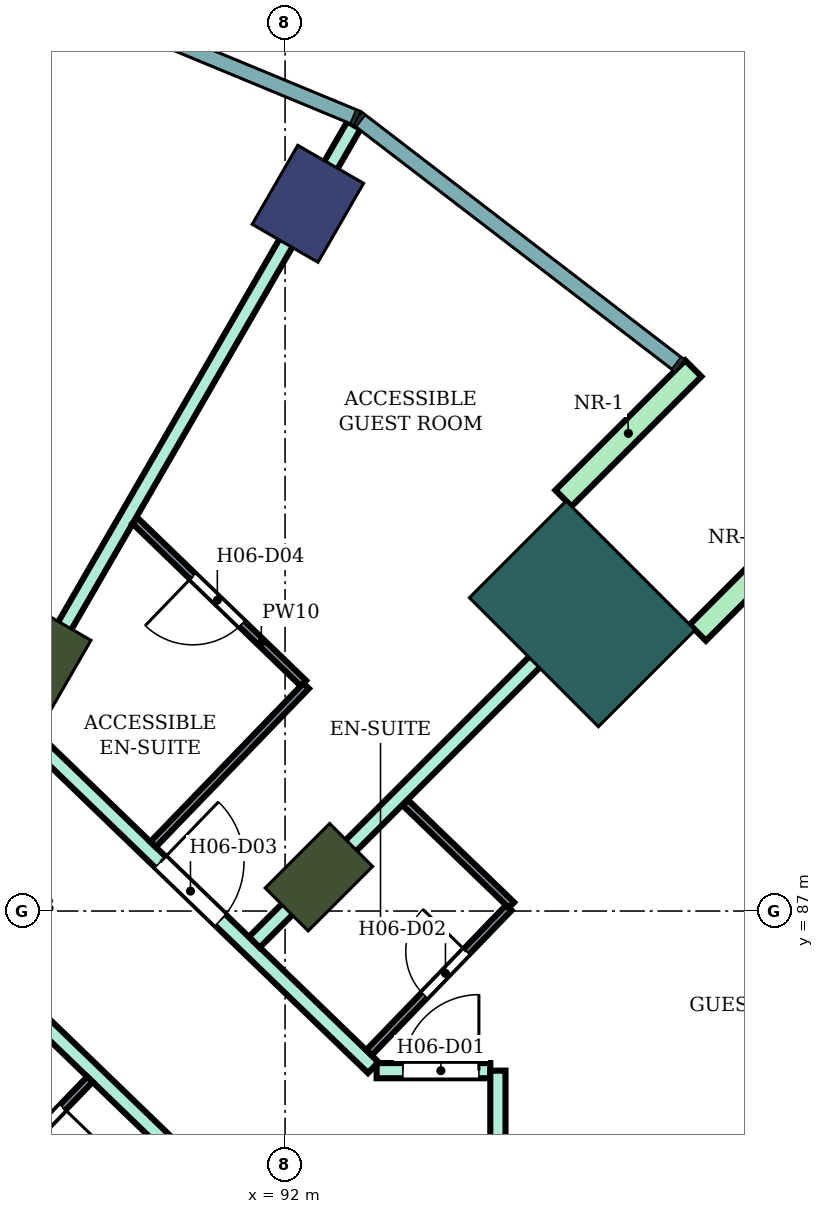
"""IFC4 building model, lengths in metres.
Left out: names, types, materials, properties, quantities, classifications, styles, units other than length and angle.
Written with IfcOpenShell. Run it as: python <this file> out.ifc"""

import sys

from ifc_helpers import new_model, si_unit, direction, frame, frame_2d, origin, origin_2d, place, context, subcontext, project, spatial, rectangle, extrude, element, fill, save


model = new_model("IFC4")
c1 = context("Model", 3, precision=1e-05, world=origin(), true_north=direction((0.0, 1.0)))
c2 = subcontext(c1, "Body", "Model", "MODEL_VIEW")
j1 = project(units=[si_unit("LENGTHUNIT", "METRE"), si_unit("PLANEANGLEUNIT", "RADIAN")], contexts=[c1])
p1 = place(None, origin())
s1 = spatial("IfcSite", under=j1, at=p1, CompositionType="ELEMENT")
p2 = place(p1, origin())
s2 = spatial("IfcBuilding", under=s1, at=p2, CompositionType="ELEMENT")
p3 = place(p2, frame((0.0, 0.0, 93.8)))
s3 = spatial("IfcBuildingStorey", under=s2, at=p3, CompositionType="ELEMENT", Elevation=93.8)
p4 = place(p3, frame((92.3, 96.304, 0.0), z_axis=(0.0, 0.0, 1.0), x_axis=(0.5, 0.866025403784, 0.0)))
e1 = element("IfcColumn", 1, at=p4, inside=s3, PredefinedType="COLUMN", context=c2, shape_type="SweptSolid", body=[
    extrude(rectangle(XDim=1.2, YDim=1.0, at=origin_2d()), origin(), (0.0, 0.0, 1.0), 3.8),
])
for number, where, z_axis, x_axis in (
    (2, (92.445, 87.445, 0.0), (0.0, 0.0, 1.0), (0.707, 0.707, 0.0)),
    (3, (88.8, 90.242, 0.0), (0.0, 0.0, 1.0), (0.5, 0.866, 0.0)),
):
    element("IfcColumn", number, at=place(p3, frame(where, z_axis=z_axis, x_axis=x_axis)), inside=s3, PredefinedType="COLUMN", context=c2, shape_type="SweptSolid", body=[
        extrude(rectangle(XDim=1.2, YDim=0.8, at=origin_2d()), origin(), (0.0, 0.0, 1.0), 3.8),
    ])
p5 = place(p3, frame((95.91, 90.91, 0.0), z_axis=(0.0, 0.0, 1.0), x_axis=(0.707106781187, 0.707106781187, 0.0)))
e4 = element("IfcColumn", 4, at=p5, inside=s3, PredefinedType="COLUMN", context=c2, shape_type="SweptSolid", body=[
    extrude(rectangle(XDim=1.8, YDim=2.4, at=origin_2d()), origin(), (0.0, 0.0, 1.0), 3.8),
])
for number, where, z_axis, x_axis in (
    (5, (97.43, 90.662, 0.0), (0.0, 0.0, 1.0), (0.707, 0.707, 0.0)),
    (6, (95.662, 92.43, 0.0), (0.0, 0.0, 1.0), (0.707, 0.707, 0.0)),
):
    element("IfcWall", number, at=place(p3, frame(where, z_axis=z_axis, x_axis=x_axis)), inside=s3, PredefinedType="NOTDEFINED", context=c2, shape_type="SweptSolid", body=[
        extrude(rectangle(XDim=2.416, YDim=0.3, at=frame_2d((1.208, 0.0))), origin(), (0.0, 0.0, 1.0), 3.8),
    ])
p6 = place(p3, frame((87.064, 87.211, 0.0), z_axis=(0.0, 0.0, 1.0), x_axis=(0.719540958932, -0.694450004262, 0.0)))
e7 = element("IfcWall", 7, at=p6, inside=s3, PredefinedType="PARTITIONING", context=c2, shape_type="SweptSolid", body=[
    extrude(rectangle(XDim=5.488, YDim=0.2, at=frame_2d((2.744, 0.0))), origin(), (0.0, 0.0, 1.0), 3.35),
])
p7 = place(p6, frame((0.55, 0.0, 0.0)))
e8 = element("IfcOpeningElement", 8, at=p7, cuts=e7, PredefinedType="OPENING", context=c2, shape_type="SweptSolid", body=[
    extrude(rectangle(XDim=1.0, YDim=2.1, at=frame_2d((0.5, 1.05))), frame((0.0, 0.11, 0.0), z_axis=(0.0, -1.0, 0.0), x_axis=(1.0, 0.0, 0.0)), (0.0, 0.0, 1.0), 0.22),
])
p8 = place(p3, frame((88.465, 89.473, 0.0), z_axis=(0.0, 0.0, 1.0), x_axis=(0.719474304909, -0.694519059908, 0.0)))
e9 = element("IfcWall", 9, at=p8, inside=s3, PredefinedType="PARTITIONING", context=c2, shape_type="SweptSolid", body=[
    extrude(rectangle(XDim=6.525, YDim=0.2, at=frame_2d((3.263, 0.0))), origin(), (0.0, 0.0, 1.0), 3.35),
])
p9 = place(p8, frame((2.633, 0.0, 0.0)))
e10 = element("IfcOpeningElement", 10, at=p9, cuts=e9, PredefinedType="OPENING", context=c2, shape_type="SweptSolid", body=[
    extrude(rectangle(XDim=1.1, YDim=2.1, at=frame_2d((0.55, 1.05))), frame((0.0, 0.11, 0.0), z_axis=(0.0, -1.0, 0.0), x_axis=(1.0, 0.0, 0.0)), (0.0, 0.0, 1.0), 0.22),
])
p10 = place(p3, frame((88.4, 89.538, 0.0), z_axis=(0.0, 0.0, 1.0), x_axis=(0.500234695877, 0.865889859648, 0.0)))
e11 = element("IfcWall", 11, at=p10, inside=s3, PredefinedType="PARTITIONING", context=c2, shape_type="SweptSolid", body=[
    extrude(rectangle(XDim=9.007, YDim=0.2, at=frame_2d((4.503, 0.0))), origin(), (0.0, 0.0, 1.0), 3.35),
])
p11 = place(p3, frame((91.595, 86.59, 0.0), z_axis=(0.0, 0.0, 1.0), x_axis=(0.707232337591, 0.706981202484, 0.0)))
e12 = element("IfcWall", 12, at=p11, inside=s3, PredefinedType="PARTITIONING", context=c2, shape_type="SweptSolid", body=[
    extrude(rectangle(XDim=6.805, YDim=0.2, at=frame_2d((3.402, 0.0))), origin(), (0.0, 0.0, 1.0), 3.35),
])
p12 = place(p3, frame((93.204, 84.9, 0.0), z_axis=(0.0, 0.0, 1.0), x_axis=(1.0, 0.0, 0.0)))
e13 = element("IfcWall", 13, at=p12, inside=s3, PredefinedType="PARTITIONING", context=c2, shape_type="SweptSolid", body=[
    extrude(rectangle(XDim=1.496, YDim=0.2, at=frame_2d((0.748, 0.0))), origin(), (0.0, 0.0, 1.0), 3.35),
])
p13 = place(p12, frame((0.346, 0.0, 0.0)))
e14 = element("IfcOpeningElement", 14, at=p13, cuts=e13, PredefinedType="OPENING", context=c2, shape_type="SweptSolid", body=[
    extrude(rectangle(XDim=1.0, YDim=2.1, at=frame_2d((0.5, 1.05))), frame((0.0, 0.11, 0.0), z_axis=(0.0, -1.0, 0.0), x_axis=(1.0, 0.0, 0.0)), (0.0, 0.0, 1.0), 0.22),
])
p14 = place(p3, frame((94.8, 83.401, 0.0), z_axis=(0.0, 0.0, 1.0), x_axis=(0.0, 1.0, 0.0)))
e15 = element("IfcWall", 15, at=p14, inside=s3, PredefinedType="PARTITIONING", context=c2, shape_type="SweptSolid", body=[
    extrude(rectangle(XDim=1.499, YDim=0.2, at=frame_2d((0.75, 0.0))), origin(), (0.0, 0.0, 1.0), 3.35),
])
p15 = place(p3, frame((88.095, 83.4, 0.0), z_axis=(0.0, 0.0, 1.0), x_axis=(0.694447472534, 0.719543402368, 0.0)))
e16 = element("IfcWall", 16, at=p15, inside=s3, PredefinedType="PARTITIONING", context=c2, shape_type="SweptSolid", body=[
    extrude(rectangle(XDim=1.926, YDim=0.1, at=frame_2d((0.963, 0.0))), origin(), (0.0, 0.0, 1.0), 3.35),
])
p16 = place(p15, frame((0.613, 0.0, 0.0)))
e17 = element("IfcOpeningElement", 17, at=p16, cuts=e16, PredefinedType="OPENING", context=c2, shape_type="SweptSolid", body=[
    extrude(rectangle(XDim=0.8, YDim=2.1, at=frame_2d((0.4, 1.05))), frame((0.0, 0.06, 0.0), z_axis=(0.0, -1.0, 0.0), x_axis=(1.0, 0.0, 0.0)), (0.0, 0.0, 1.0), 0.12),
])
p17 = place(p3, frame((90.027, 92.134, 0.0), z_axis=(0.0, 0.0, 1.0), x_axis=(0.719415132118, -0.694580353652, 0.0)))
e18 = element("IfcWall", 18, at=p17, inside=s3, PredefinedType="PARTITIONING", context=c2, shape_type="SweptSolid", body=[
    extrude(rectangle(XDim=3.077, YDim=0.1, at=frame_2d((1.539, 0.0))), origin(), (0.0, 0.0, 1.0), 3.35),
])
p18 = place(p17, frame((1.053, 0.0, 0.0)))
e19 = element("IfcOpeningElement", 19, at=p18, cuts=e18, PredefinedType="OPENING", context=c2, shape_type="SweptSolid", body=[
    extrude(rectangle(XDim=0.9, YDim=2.1, at=frame_2d((0.45, 1.05))), frame((0.0, 0.06, 0.0), z_axis=(0.0, -1.0, 0.0), x_axis=(1.0, 0.0, 0.0)), (0.0, 0.0, 1.0), 0.12),
])
p19 = place(p3, frame((90.263, 87.876, 0.0), z_axis=(0.0, 0.0, 1.0), x_axis=(0.694534400859, 0.719459495749, 0.0)))
e20 = element("IfcWall", 20, at=p19, inside=s3, PredefinedType="PARTITIONING", context=c2, shape_type="SweptSolid", body=[
    extrude(rectangle(XDim=2.899, YDim=0.1, at=frame_2d((1.45, 0.0))), origin(), (0.0, 0.0, 1.0), 3.35),
])
p20 = place(p3, frame((93.104, 85.136, 0.0), z_axis=(0.0, 0.0, 1.0), x_axis=(0.694324808789, 0.719661767708, 0.0)))
e21 = element("IfcWall", 21, at=p20, inside=s3, PredefinedType="PARTITIONING", context=c2, shape_type="SweptSolid", body=[
    extrude(rectangle(XDim=2.65, YDim=0.1, at=frame_2d((1.325, 0.0))), origin(), (0.0, 0.0, 1.0), 3.35),
])
p21 = place(p20, frame((1.05, 0.0, 0.0)))
e22 = element("IfcOpeningElement", 22, at=p21, cuts=e21, PredefinedType="OPENING", context=c2, shape_type="SweptSolid", body=[
    extrude(rectangle(XDim=0.8, YDim=2.1, at=frame_2d((0.4, 1.05))), frame((0.0, 0.06, 0.0), z_axis=(0.0, -1.0, 0.0), x_axis=(1.0, 0.0, 0.0)), (0.0, 0.0, 1.0), 0.12),
])
p22 = place(p3, frame((93.582, 88.426, 0.0), z_axis=(0.0, 0.0, 1.0), x_axis=(0.719707242969, -0.694277670977, 0.0)))
e23 = element("IfcWall", 23, at=p22, inside=s3, PredefinedType="PARTITIONING", context=c2, shape_type="SweptSolid", body=[
    extrude(rectangle(XDim=1.939, YDim=0.1, at=frame_2d((0.97, 0.0))), origin(), (0.0, 0.0, 1.0), 3.35),
])
p23 = place(p13, origin())
e24 = element("IfcDoor", 24, at=p23, inside=s3, OperationType="SINGLE_SWING_RIGHT", PredefinedType="DOOR", context=c2, shape_type="SweptSolid", body=[
    extrude(rectangle(XDim=1.0, YDim=2.1, at=frame_2d((0.5, 1.05))), frame((0.0, 0.025, 0.0), z_axis=(0.0, -1.0, 0.0), x_axis=(1.0, 0.0, 0.0)), (0.0, 0.0, 1.0), 0.05),
])
fill(e14, e24)
p24 = place(p21, origin())
e25 = element("IfcDoor", 25, at=p24, inside=s3, OperationType="SINGLE_SWING_RIGHT", PredefinedType="DOOR", context=c2, shape_type="SweptSolid", body=[
    extrude(rectangle(XDim=0.8, YDim=2.1, at=frame_2d((0.4, 1.05))), frame((0.0, 0.025, 0.0), z_axis=(0.0, -1.0, 0.0), x_axis=(1.0, 0.0, 0.0)), (0.0, 0.0, 1.0), 0.05),
])
fill(e22, e25)
p25 = place(p9, origin())
e26 = element("IfcDoor", 26, at=p25, inside=s3, OperationType="SINGLE_SWING_LEFT", PredefinedType="DOOR", context=c2, shape_type="SweptSolid", body=[
    extrude(rectangle(XDim=1.1, YDim=2.1, at=frame_2d((0.55, 1.05))), frame((0.0, 0.025, 0.0), z_axis=(0.0, -1.0, 0.0), x_axis=(1.0, 0.0, 0.0)), (0.0, 0.0, 1.0), 0.05),
])
fill(e10, e26)
p26 = place(p18, frame((0.9, 0.0, 0.0), z_axis=(0.0, 0.0, 1.0), x_axis=(-1.0, 0.0, 0.0)))
e27 = element("IfcDoor", 27, at=p26, inside=s3, OperationType="SINGLE_SWING_RIGHT", PredefinedType="DOOR", context=c2, shape_type="SweptSolid", body=[
    extrude(rectangle(XDim=0.9, YDim=2.1, at=frame_2d((0.45, 1.05))), frame((0.0, 0.025, 0.0), z_axis=(0.0, -1.0, 0.0), x_axis=(1.0, 0.0, 0.0)), (0.0, 0.0, 1.0), 0.05),
])
fill(e19, e27)
p27 = place(p16, frame((0.8, 0.0, 0.0), z_axis=(0.0, 0.0, 1.0), x_axis=(-1.0, 0.0, 0.0)))
e28 = element("IfcDoor", 28, at=p27, inside=s3, OperationType="SINGLE_SWING_LEFT", PredefinedType="DOOR", context=c2, shape_type="SweptSolid", body=[
    extrude(rectangle(XDim=0.8, YDim=2.1, at=frame_2d((0.4, 1.05))), frame((0.0, 0.025, 0.0), z_axis=(0.0, -1.0, 0.0), x_axis=(1.0, 0.0, 0.0)), (0.0, 0.0, 1.0), 0.05),
])
fill(e17, e28)
save(model, sys.argv[1])
